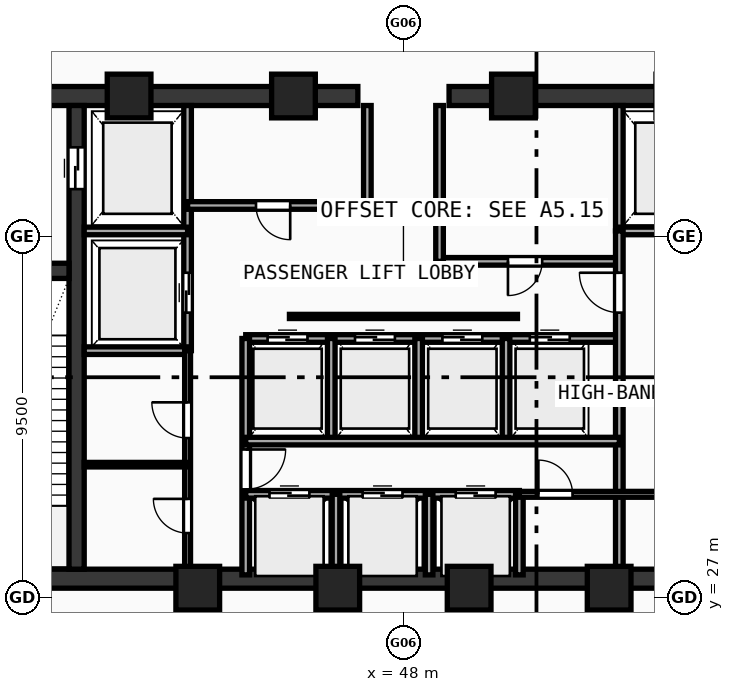
"""IFC4 building model, lengths in metres.
Left out: names, types, materials, properties, quantities, classifications, styles, units other than length and angle.
Written with IfcOpenShell. Run it as: python <this file> out.ifc"""

import sys

from ifc_helpers import new_model, si_unit, direction, frame, frame_2d, origin, origin_with_axes, origin_2d, place, context, subcontext, project, spatial, rectangle, hollow_rectangle, extrude, source, transform, mapped, element, fill, save


model = new_model("IFC4")
c1 = context("Model", 3, precision=1e-05, world=origin(), true_north=direction((0.0, 1.0)))
c2 = subcontext(c1, "Body", "Model", "MODEL_VIEW")
j1 = project(units=[si_unit("LENGTHUNIT", "METRE"), si_unit("PLANEANGLEUNIT", "RADIAN")], contexts=[c1])
p1 = place(None, origin())
s1 = spatial("IfcSite", under=j1, at=p1, CompositionType="ELEMENT")
p2 = place(p1, origin())
s2 = spatial("IfcBuilding", under=s1, at=p2, CompositionType="ELEMENT")
p3 = place(p2, frame((0.0, 0.0, 218.96)))
s3 = spatial("IfcBuildingStorey", under=s2, at=p3, CompositionType="ELEMENT", Elevation=218.96)
p4 = place(p3, frame((35.55, 27.5, 0.0), z_axis=(0.0, 0.0, 1.0), x_axis=(1.0, 0.0, 0.0)))
e1 = element("IfcWall", 1, at=p4, inside=s3, PredefinedType="SHEAR", context=c2, shape_type="SweptSolid", body=[
    extrude(rectangle(XDim=24.9, YDim=0.5, at=frame_2d((12.45, 0.0))), origin(), (0.0, 0.0, 1.0), 5.57),
])
p5 = place(p3, frame((35.55, 40.2, 0.0), z_axis=(0.0, 0.0, 1.0), x_axis=(1.0, 0.0, 0.0)))
e2 = element("IfcWall", 2, at=p5, inside=s3, PredefinedType="SHEAR", context=c2, shape_type="SweptSolid", body=[
    extrude(rectangle(XDim=11.25, YDim=0.5, at=frame_2d((5.625, 0.0))), origin(), (0.0, 0.0, 1.0), 5.57),
])
p6 = place(p5, frame((1.6, 0.0, 0.0)))
e3 = element("IfcOpeningElement", 3, at=p6, cuts=e2, PredefinedType="OPENING", context=c2, shape_type="SweptSolid", body=[
    extrude(rectangle(XDim=1.05, YDim=2.1, at=frame_2d((0.525, 1.05))), frame((0.0, 0.26, 0.0), z_axis=(0.0, -1.0, 0.0), x_axis=(1.0, 0.0, 0.0)), (0.0, 0.0, 1.0), 0.52),
])
p7 = place(p3, frame((49.2, 40.2, 0.0), z_axis=(0.0, 0.0, 1.0), x_axis=(1.0, 0.0, 0.0)))
e4 = element("IfcWall", 4, at=p7, inside=s3, PredefinedType="SHEAR", context=c2, shape_type="SweptSolid", body=[
    extrude(rectangle(XDim=11.25, YDim=0.5, at=frame_2d((5.625, 0.0))), origin(), (0.0, 0.0, 1.0), 5.57),
])
p8 = place(p7, frame((8.6, 0.0, 0.0)))
e5 = element("IfcOpeningElement", 5, at=p8, cuts=e4, PredefinedType="OPENING", context=c2, shape_type="SweptSolid", body=[
    extrude(rectangle(XDim=1.05, YDim=2.1, at=frame_2d((0.525, 1.05))), frame((0.0, 0.26, 0.0), z_axis=(0.0, -1.0, 0.0), x_axis=(1.0, 0.0, 0.0)), (0.0, 0.0, 1.0), 0.52),
])
p9 = place(p3, frame((39.4, 27.75, 0.0), z_axis=(0.0, 0.0, 1.0), x_axis=(0.0, 1.0, 0.0)))
e6 = element("IfcWall", 6, at=p9, inside=s3, PredefinedType="SHEAR", context=c2, shape_type="SweptSolid", body=[
    extrude(rectangle(XDim=12.2, YDim=0.4, at=frame_2d((6.1, 0.0))), origin(), (0.0, 0.0, 1.0), 5.57),
])
p10 = place(p9, frame((10.0, 0.0, 0.0)))
e7 = element("IfcOpeningElement", 7, at=p10, cuts=e6, PredefinedType="OPENING", context=c2, shape_type="SweptSolid", body=[
    extrude(rectangle(XDim=1.1, YDim=2.1, at=frame_2d((0.55, 1.05))), frame((0.0, 0.21, 0.0), z_axis=(0.0, -1.0, 0.0), x_axis=(1.0, 0.0, 0.0)), (0.0, 0.0, 1.0), 0.42),
])
p11 = place(p3, frame((36.05, 35.6, 0.0), z_axis=(0.0, 0.0, 1.0), x_axis=(1.0, 0.0, 0.0)))
e8 = element("IfcWall", 8, at=p11, inside=s3, PredefinedType="SHEAR", context=c2, shape_type="SweptSolid", body=[
    extrude(rectangle(XDim=3.15, YDim=0.4, at=frame_2d((1.575, 0.0))), origin(), (0.0, 0.0, 1.0), 5.57),
])
p12 = place(p11, frame((1.07, 0.0, 0.0)))
e9 = element("IfcOpeningElement", 9, at=p12, cuts=e8, PredefinedType="OPENING", context=c2, shape_type="SweptSolid", body=[
    extrude(rectangle(XDim=1.05, YDim=2.1, at=frame_2d((0.525, 1.05))), frame((0.0, 0.21, 0.0), z_axis=(0.0, -1.0, 0.0), x_axis=(1.0, 0.0, 0.0)), (0.0, 0.0, 1.0), 0.42),
])
m1 = source(origin(), c2, "Body", "SweptSolid", [
    extrude(hollow_rectangle(XDim=1.15, YDim=1.15, WallThickness=0.048, at=origin_2d()), origin(), (0.0, 0.0, 1.0), 5.85),
])
for number, where, z_axis, x_axis in (
    (10, (42.588, 27.25, -0.28), (0.0, 0.0, 1.0), (1.0, 0.0, 0.0)),
    (11, (46.272, 27.25, -0.28), (0.0, 0.0, 1.0), (1.0, 0.0, 0.0)),
    (12, (49.729, 27.25, -0.28), (0.0, 0.0, 1.0), (1.0, 0.0, 0.0)),
    (13, (53.412, 27.25, -0.28), (0.0, 0.0, 1.0), (1.0, 0.0, 0.0)),
    (14, (50.894, 40.2, -0.28), (0.0, 0.0, 1.0), (1.0, 0.0, 0.0)),
    (15, (45.106, 40.2, -0.28), (0.0, 0.0, 1.0), (1.0, 0.0, 0.0)),
    (16, (40.781, 40.2, -0.28), (0.0, 0.0, 1.0), (1.0, 0.0, 0.0)),
):
    element("IfcColumn", number, at=place(p3, frame(where, z_axis=z_axis, x_axis=x_axis)), inside=s3, PredefinedType="COLUMN", context=c2, shape_type="MappedRepresentation", body=[
        mapped(m1, transform((0.0, 0.0, 0.0), scale=1.0)),
    ])
p13 = place(p3, frame((42.32, 33.5, 0.0), z_axis=(0.0, 0.0, 1.0), x_axis=(0.0, 1.0, 0.0)))
e17 = element("IfcWall", 17, at=p13, inside=s3, PredefinedType="SOLIDWALL", context=c2, shape_type="SweptSolid", body=[
    extrude(rectangle(XDim=6.45, YDim=0.2, at=frame_2d((3.225, 0.0))), origin(), (0.0, 0.0, 1.0), 5.57),
])
p14 = place(p13, frame((1.0, 0.0, 0.0)))
e18 = element("IfcOpeningElement", 18, at=p14, cuts=e17, PredefinedType="OPENING", context=c2, shape_type="SweptSolid", body=[
    extrude(rectangle(XDim=1.05, YDim=2.1, at=frame_2d((0.525, 1.05))), frame((0.0, 0.11, 0.0), z_axis=(0.0, -1.0, 0.0), x_axis=(1.0, 0.0, 0.0)), (0.0, 0.0, 1.0), 0.22),
])
for number, where, z_axis, x_axis in (
    (19, (39.6, 36.65, 0.0), (0.0, 0.0, 1.0), (1.0, 0.0, 0.0)),
    (20, (39.6, 33.5, 0.0), (0.0, 0.0, 1.0), (1.0, 0.0, 0.0)),
):
    element("IfcWall", number, at=place(p3, frame(where, z_axis=z_axis, x_axis=x_axis)), inside=s3, PredefinedType="SOLIDWALL", context=c2, shape_type="SweptSolid", body=[
        extrude(rectangle(XDim=2.72, YDim=0.2, at=frame_2d((1.36, 0.0))), origin(), (0.0, 0.0, 1.0), 5.57),
    ])
p15 = place(p3, frame((53.68, 36.65, 0.0), z_axis=(0.0, 0.0, 1.0), x_axis=(0.0, 1.0, 0.0)))
e21 = element("IfcWall", 21, at=p15, inside=s3, PredefinedType="SOLIDWALL", context=c2, shape_type="SweptSolid", body=[
    extrude(rectangle(XDim=3.3, YDim=0.2, at=frame_2d((1.65, 0.0))), origin(), (0.0, 0.0, 1.0), 5.57),
])
p16 = place(p3, frame((53.68, 36.65, 0.0), z_axis=(0.0, 0.0, 1.0), x_axis=(1.0, 0.0, 0.0)))
e22 = element("IfcWall", 22, at=p16, inside=s3, PredefinedType="SOLIDWALL", context=c2, shape_type="SweptSolid", body=[
    extrude(rectangle(XDim=2.72, YDim=0.2, at=frame_2d((1.36, 0.0))), origin(), (0.0, 0.0, 1.0), 5.57),
])
p17 = place(p3, frame((42.32, 37.32, 0.0), z_axis=(0.0, 0.0, 1.0), x_axis=(1.0, 0.0, 0.0)))
e23 = element("IfcWall", 23, at=p17, inside=s3, PredefinedType="SOLIDWALL", context=c2, shape_type="SweptSolid", body=[
    extrude(rectangle(XDim=4.73, YDim=0.2, at=frame_2d((2.365, 0.0))), origin(), (0.0, 0.0, 1.0), 5.57),
])
p18 = place(p17, frame((1.8, 0.0, 0.0)))
e24 = element("IfcOpeningElement", 24, at=p18, cuts=e23, PredefinedType="OPENING", context=c2, shape_type="SweptSolid", body=[
    extrude(rectangle(XDim=0.9, YDim=2.1, at=frame_2d((0.45, 1.05))), frame((0.0, 0.11, 0.0), z_axis=(0.0, -1.0, 0.0), x_axis=(1.0, 0.0, 0.0)), (0.0, 0.0, 1.0), 0.22),
])
p19 = place(p3, frame((48.95, 35.85, 0.0), z_axis=(0.0, 0.0, 1.0), x_axis=(1.0, 0.0, 0.0)))
e25 = element("IfcWall", 25, at=p19, inside=s3, PredefinedType="SOLIDWALL", context=c2, shape_type="SweptSolid", body=[
    extrude(rectangle(XDim=4.73, YDim=0.2, at=frame_2d((2.365, 0.0))), origin(), (0.0, 0.0, 1.0), 5.57),
])
p20 = place(p19, frame((1.8, 0.0, 0.0)))
e26 = element("IfcOpeningElement", 26, at=p20, cuts=e25, PredefinedType="OPENING", context=c2, shape_type="SweptSolid", body=[
    extrude(rectangle(XDim=0.9, YDim=2.1, at=frame_2d((0.45, 1.05))), frame((0.0, 0.11, 0.0), z_axis=(0.0, -1.0, 0.0), x_axis=(1.0, 0.0, 0.0)), (0.0, 0.0, 1.0), 0.22),
])
p21 = place(p3, frame((47.05, 37.32, 0.0), z_axis=(0.0, 0.0, 1.0), x_axis=(0.0, 1.0, 0.0)))
e27 = element("IfcWall", 27, at=p21, inside=s3, PredefinedType="SOLIDWALL", context=c2, shape_type="SweptSolid", body=[
    extrude(rectangle(XDim=2.63, YDim=0.2, at=frame_2d((1.315, 0.0))), origin(), (0.0, 0.0, 1.0), 5.57),
])
p22 = place(p3, frame((48.95, 35.85, 0.0), z_axis=(0.0, 0.0, 1.0), x_axis=(0.0, 1.0, 0.0)))
e28 = element("IfcWall", 28, at=p22, inside=s3, PredefinedType="SOLIDWALL", context=c2, shape_type="SweptSolid", body=[
    extrude(rectangle(XDim=4.1, YDim=0.2, at=frame_2d((2.05, 0.0))), origin(), (0.0, 0.0, 1.0), 5.57),
])
p23 = place(p3, frame((43.85, 33.82, 0.0), z_axis=(0.0, 0.0, 1.0), x_axis=(1.0, 0.0, 0.0)))
e29 = element("IfcWall", 29, at=p23, inside=s3, PredefinedType="SOLIDWALL", context=c2, shape_type="SweptSolid", body=[
    extrude(rectangle(XDim=9.83, YDim=0.2, at=frame_2d((4.915, 0.0))), origin(), (0.0, 0.0, 1.0), 5.57),
])
p24 = place(p23, frame((0.575, 0.0, 0.0)))
e30 = element("IfcOpeningElement", 30, at=p24, cuts=e29, PredefinedType="OPENING", context=c2, shape_type="SweptSolid", body=[
    extrude(rectangle(XDim=1.05, YDim=2.1, at=frame_2d((0.525, 1.05))), frame((0.0, 0.11, 0.0), z_axis=(0.0, -1.0, 0.0), x_axis=(1.0, 0.0, 0.0)), (0.0, 0.0, 1.0), 0.22),
])
p25 = place(p23, frame((2.875, 0.0, 0.0)))
e31 = element("IfcOpeningElement", 31, at=p25, cuts=e29, PredefinedType="OPENING", context=c2, shape_type="SweptSolid", body=[
    extrude(rectangle(XDim=1.05, YDim=2.1, at=frame_2d((0.525, 1.05))), frame((0.0, 0.11, 0.0), z_axis=(0.0, -1.0, 0.0), x_axis=(1.0, 0.0, 0.0)), (0.0, 0.0, 1.0), 0.22),
])
p26 = place(p23, frame((5.175, 0.0, 0.0)))
e32 = element("IfcOpeningElement", 32, at=p26, cuts=e29, PredefinedType="OPENING", context=c2, shape_type="SweptSolid", body=[
    extrude(rectangle(XDim=1.05, YDim=2.1, at=frame_2d((0.525, 1.05))), frame((0.0, 0.11, 0.0), z_axis=(0.0, -1.0, 0.0), x_axis=(1.0, 0.0, 0.0)), (0.0, 0.0, 1.0), 0.22),
])
p27 = place(p23, frame((7.475, 0.0, 0.0)))
e33 = element("IfcOpeningElement", 33, at=p27, cuts=e29, PredefinedType="OPENING", context=c2, shape_type="SweptSolid", body=[
    extrude(rectangle(XDim=1.05, YDim=2.1, at=frame_2d((0.525, 1.05))), frame((0.0, 0.11, 0.0), z_axis=(0.0, -1.0, 0.0), x_axis=(1.0, 0.0, 0.0)), (0.0, 0.0, 1.0), 0.22),
])
p28 = place(p3, frame((43.85, 27.6, 0.0), z_axis=(0.0, 0.0, 1.0), x_axis=(0.0, 1.0, 0.0)))
e34 = element("IfcWall", 34, at=p28, inside=s3, PredefinedType="SOLIDWALL", context=c2, shape_type="SweptSolid", body=[
    extrude(rectangle(XDim=6.22, YDim=0.2, at=frame_2d((3.11, 0.0))), origin(), (0.0, 0.0, 1.0), 5.57),
])
p29 = place(p28, frame((2.25, 0.0, 0.0)))
e35 = element("IfcOpeningElement", 35, at=p29, cuts=e34, PredefinedType="OPENING", context=c2, shape_type="SweptSolid", body=[
    extrude(rectangle(XDim=1.05, YDim=2.1, at=frame_2d((0.525, 1.05))), frame((0.0, 0.11, 0.0), z_axis=(0.0, -1.0, 0.0), x_axis=(1.0, 0.0, 0.0)), (0.0, 0.0, 1.0), 0.22),
])
p30 = place(p3, frame((53.68, 27.6, 0.0), z_axis=(0.0, 0.0, 1.0), x_axis=(0.0, 1.0, 0.0)))
e36 = element("IfcWall", 36, at=p30, inside=s3, PredefinedType="SOLIDWALL", context=c2, shape_type="SweptSolid", body=[
    extrude(rectangle(XDim=9.05, YDim=0.2, at=frame_2d((4.525, 0.0))), origin(), (0.0, 0.0, 1.0), 2.22),
])
p31 = place(p30, frame((6.9, 0.0, 0.0)))
e37 = element("IfcOpeningElement", 37, at=p31, cuts=e36, PredefinedType="OPENING", context=c2, shape_type="SweptSolid", body=[
    extrude(rectangle(XDim=1.05, YDim=2.1, at=frame_2d((0.525, 1.05))), frame((0.0, 0.11, 0.0), z_axis=(0.0, -1.0, 0.0), x_axis=(1.0, 0.0, 0.0)), (0.0, 0.0, 1.0), 0.22),
])
for number, where, z_axis, x_axis in (
    (38, (46.1, 31.12, 0.0), (0.0, 0.0, 1.0), (0.0, 1.0, 0.0)),
    (39, (48.4, 31.12, 0.0), (0.0, 0.0, 1.0), (0.0, 1.0, 0.0)),
    (40, (50.7, 31.12, 0.0), (0.0, 0.0, 1.0), (0.0, 1.0, 0.0)),
):
    element("IfcWall", number, at=place(p3, frame(where, z_axis=z_axis, x_axis=x_axis)), inside=s3, PredefinedType="SOLIDWALL", context=c2, shape_type="SweptSolid", body=[
        extrude(rectangle(XDim=2.7, YDim=0.2, at=frame_2d((1.35, 0.0))), origin(), (0.0, 0.0, 1.0), 5.57),
    ])
p32 = place(p3, frame((43.85, 29.72, 0.0), z_axis=(0.0, 0.0, 1.0), x_axis=(1.0, 0.0, 0.0)))
e41 = element("IfcWall", 41, at=p32, inside=s3, PredefinedType="SOLIDWALL", context=c2, shape_type="SweptSolid", body=[
    extrude(rectangle(XDim=7.2, YDim=0.2, at=frame_2d((3.6, 0.0))), origin(), (0.0, 0.0, 1.0), 5.57),
])
p33 = place(p32, frame((0.625, 0.0, 0.0)))
e42 = element("IfcOpeningElement", 42, at=p33, cuts=e41, PredefinedType="OPENING", context=c2, shape_type="SweptSolid", body=[
    extrude(rectangle(XDim=1.05, YDim=2.1, at=frame_2d((0.525, 1.05))), frame((0.0, 0.11, 0.0), z_axis=(0.0, -1.0, 0.0), x_axis=(1.0, 0.0, 0.0)), (0.0, 0.0, 1.0), 0.22),
])
p34 = place(p32, frame((3.075, 0.0, 0.0)))
e43 = element("IfcOpeningElement", 43, at=p34, cuts=e41, PredefinedType="OPENING", context=c2, shape_type="SweptSolid", body=[
    extrude(rectangle(XDim=1.05, YDim=2.1, at=frame_2d((0.525, 1.05))), frame((0.0, 0.11, 0.0), z_axis=(0.0, -1.0, 0.0), x_axis=(1.0, 0.0, 0.0)), (0.0, 0.0, 1.0), 0.22),
])
p35 = place(p32, frame((5.525, 0.0, 0.0)))
e44 = element("IfcOpeningElement", 44, at=p35, cuts=e41, PredefinedType="OPENING", context=c2, shape_type="SweptSolid", body=[
    extrude(rectangle(XDim=1.05, YDim=2.1, at=frame_2d((0.525, 1.05))), frame((0.0, 0.11, 0.0), z_axis=(0.0, -1.0, 0.0), x_axis=(1.0, 0.0, 0.0)), (0.0, 0.0, 1.0), 0.22),
])
p36 = place(p3, frame((51.05, 27.6, 0.0), z_axis=(0.0, 0.0, 1.0), x_axis=(0.0, 1.0, 0.0)))
e45 = element("IfcWall", 45, at=p36, inside=s3, PredefinedType="SOLIDWALL", context=c2, shape_type="SweptSolid", body=[
    extrude(rectangle(XDim=2.12, YDim=0.2, at=frame_2d((1.06, 0.0))), origin(), (0.0, 0.0, 1.0), 5.57),
])
p37 = place(p3, frame((43.85, 31.12, 0.0), z_axis=(0.0, 0.0, 1.0), x_axis=(1.0, 0.0, 0.0)))
e46 = element("IfcWall", 46, at=p37, inside=s3, PredefinedType="SOLIDWALL", context=c2, shape_type="SweptSolid", body=[
    extrude(rectangle(XDim=9.83, YDim=0.2, at=frame_2d((4.915, 0.0))), origin(), (0.0, 0.0, 1.0), 5.57),
])
p38 = place(p3, frame((46.225, 27.6, 0.0), z_axis=(0.0, 0.0, 1.0), x_axis=(0.0, 1.0, 0.0)))
e47 = element("IfcWall", 47, at=p38, inside=s3, PredefinedType="SOLIDWALL", context=c2, shape_type="SweptSolid", body=[
    extrude(rectangle(XDim=2.12, YDim=0.2, at=frame_2d((1.06, 0.0))), origin(), (0.0, 0.0, 1.0), 2.22),
])
p39 = place(p3, frame((48.675, 27.6, 0.0), z_axis=(0.0, 0.0, 1.0), x_axis=(0.0, 1.0, 0.0)))
e48 = element("IfcWall", 48, at=p39, inside=s3, PredefinedType="SOLIDWALL", context=c2, shape_type="SweptSolid", body=[
    extrude(rectangle(XDim=2.12, YDim=0.2, at=frame_2d((1.06, 0.0))), origin(), (0.0, 0.0, 1.0), 5.57),
])
p40 = place(p3, frame((42.32, 27.6, 0.0), z_axis=(0.0, 0.0, 1.0), x_axis=(0.0, 1.0, 0.0)))
e49 = element("IfcWall", 49, at=p40, inside=s3, PredefinedType="PARTITIONING", context=c2, shape_type="SweptSolid", body=[
    extrude(rectangle(XDim=5.9, YDim=0.155, at=frame_2d((2.95, 0.0))), origin(), (0.0, 0.0, 1.0), 2.22),
])
p41 = place(p40, frame((1.1, 0.0, 0.0)))
e50 = element("IfcOpeningElement", 50, at=p41, cuts=e49, PredefinedType="OPENING", context=c2, shape_type="SweptSolid", body=[
    extrude(rectangle(XDim=0.9, YDim=2.1, at=frame_2d((0.45, 1.05))), frame((0.0, 0.087, 0.0), z_axis=(0.0, -1.0, 0.0), x_axis=(1.0, 0.0, 0.0)), (0.0, 0.0, 1.0), 0.175),
])
p42 = place(p40, frame((3.6, 0.0, 0.0)))
e51 = element("IfcOpeningElement", 51, at=p42, cuts=e49, PredefinedType="OPENING", context=c2, shape_type="SweptSolid", body=[
    extrude(rectangle(XDim=0.94, YDim=2.1, at=frame_2d((0.47, 1.05))), frame((0.0, 0.087, 0.0), z_axis=(0.0, -1.0, 0.0), x_axis=(1.0, 0.0, 0.0)), (0.0, 0.0, 1.0), 0.175),
])
p43 = place(p3, frame((51.05, 29.72, 0.0), z_axis=(0.0, 0.0, 1.0), x_axis=(1.0, 0.0, 0.0)))
e52 = element("IfcWall", 52, at=p43, inside=s3, PredefinedType="PARTITIONING", context=c2, shape_type="SweptSolid", body=[
    extrude(rectangle(XDim=4.07, YDim=0.155, at=frame_2d((2.035, 0.0))), origin(), (0.0, 0.0, 1.0), 5.57),
])
p44 = place(p43, frame((0.5, 0.0, 0.0)))
e53 = element("IfcOpeningElement", 53, at=p44, cuts=e52, PredefinedType="OPENING", context=c2, shape_type="SweptSolid", body=[
    extrude(rectangle(XDim=0.9, YDim=2.1, at=frame_2d((0.45, 1.05))), frame((0.0, 0.087, 0.0), z_axis=(0.0, -1.0, 0.0), x_axis=(1.0, 0.0, 0.0)), (0.0, 0.0, 1.0), 0.175),
])
p45 = place(p3, frame((39.6, 30.5, 0.0), z_axis=(0.0, 0.0, 1.0), x_axis=(1.0, 0.0, 0.0)))
e54 = element("IfcWall", 54, at=p45, inside=s3, PredefinedType="PARTITIONING", context=c2, shape_type="SweptSolid", body=[
    extrude(rectangle(XDim=2.72, YDim=0.12, at=frame_2d((1.36, 0.0))), origin(), (0.0, 0.0, 1.0), 5.57),
])
p46 = place(p3, frame((45.0, 34.4, 0.0), z_axis=(0.0, 0.0, 1.0), x_axis=(1.0, 0.0, 0.0)))
e55 = element("IfcWall", 55, at=p46, inside=s3, PredefinedType="MOVABLE", context=c2, shape_type="SweptSolid", body=[
    extrude(rectangle(XDim=6.0, YDim=0.11, at=frame_2d((3.0, 0.0))), origin(), (0.0, 0.0, 1.0), 2.5),
])
m2 = source(origin(), c2, "Body", "SweptSolid", [
    extrude(rectangle(XDim=1.1, YDim=2.1, at=frame_2d((0.55, 1.05))), frame((0.0, 0.025, 0.0), z_axis=(0.0, -1.0, 0.0), x_axis=(1.0, 0.0, 0.0)), (0.0, 0.0, 1.0), 0.05),
])
p47 = place(p10, frame((1.1, 0.0, 0.0), z_axis=(0.0, 0.0, 1.0), x_axis=(-1.0, 0.0, 0.0)))
e56 = element("IfcDoor", 56, at=p47, inside=s3, OperationType="DOUBLE_DOOR_SLIDING", PredefinedType="DOOR", context=c2, shape_type="MappedRepresentation", body=[
    mapped(m2, transform((0.0, 0.0, 0.0), scale=1.0)),
])
fill(e7, e56)
m3 = source(origin(), c2, "Body", "SweptSolid", [
    extrude(rectangle(XDim=1.05, YDim=2.1, at=frame_2d((0.525, 1.05))), frame((0.0, 0.025, 0.0), z_axis=(0.0, -1.0, 0.0), x_axis=(1.0, 0.0, 0.0)), (0.0, 0.0, 1.0), 0.05),
])
p48 = place(p14, origin_with_axes())
e57 = element("IfcDoor", 57, at=p48, inside=s3, OperationType="DOUBLE_DOOR_SLIDING", PredefinedType="DOOR", context=c2, shape_type="MappedRepresentation", body=[
    mapped(m3, transform((0.0, 0.0, 0.0), scale=1.0)),
])
fill(e18, e57)
m4 = source(origin(), c2, "Body", "SweptSolid", [
    extrude(rectangle(XDim=0.9, YDim=2.1, at=frame_2d((0.45, 1.05))), frame((0.0, 0.025, 0.0), z_axis=(0.0, -1.0, 0.0), x_axis=(1.0, 0.0, 0.0)), (0.0, 0.0, 1.0), 0.05),
])
p49 = place(p18, frame((0.9, 0.0, 0.0), z_axis=(0.0, 0.0, 1.0), x_axis=(-1.0, 0.0, 0.0)))
e58 = element("IfcDoor", 58, at=p49, inside=s3, OperationType="SINGLE_SWING_LEFT", PredefinedType="DOOR", context=c2, shape_type="MappedRepresentation", body=[
    mapped(m4, transform((0.0, 0.0, 0.0), scale=1.0)),
])
fill(e24, e58)
p50 = place(p20, frame((0.9, 0.0, 0.0), z_axis=(0.0, 0.0, 1.0), x_axis=(-1.0, 0.0, 0.0)))
e59 = element("IfcDoor", 59, at=p50, inside=s3, OperationType="SINGLE_SWING_RIGHT", PredefinedType="DOOR", context=c2, shape_type="MappedRepresentation", body=[
    mapped(m4, transform((0.0, 0.0, 0.0), scale=1.0)),
])
fill(e26, e59)
p51 = place(p24, origin_with_axes())
e60 = element("IfcDoor", 60, at=p51, inside=s3, OperationType="DOUBLE_DOOR_SLIDING", PredefinedType="DOOR", context=c2, shape_type="MappedRepresentation", body=[
    mapped(m3, transform((0.0, 0.0, 0.0), scale=1.0)),
])
fill(e30, e60)
p52 = place(p25, origin_with_axes())
e61 = element("IfcDoor", 61, at=p52, inside=s3, OperationType="DOUBLE_DOOR_SLIDING", PredefinedType="DOOR", context=c2, shape_type="MappedRepresentation", body=[
    mapped(m3, transform((0.0, 0.0, 0.0), scale=1.0)),
])
fill(e31, e61)
p53 = place(p26, origin_with_axes())
e62 = element("IfcDoor", 62, at=p53, inside=s3, OperationType="DOUBLE_DOOR_SLIDING", PredefinedType="DOOR", context=c2, shape_type="MappedRepresentation", body=[
    mapped(m3, transform((0.0, 0.0, 0.0), scale=1.0)),
])
fill(e32, e62)
p54 = place(p27, origin_with_axes())
e63 = element("IfcDoor", 63, at=p54, inside=s3, OperationType="DOUBLE_DOOR_SLIDING", PredefinedType="DOOR", context=c2, shape_type="MappedRepresentation", body=[
    mapped(m3, transform((0.0, 0.0, 0.0), scale=1.0)),
])
fill(e33, e63)
p55 = place(p29, frame((1.05, 0.0, 0.0), z_axis=(0.0, 0.0, 1.0), x_axis=(-1.0, 0.0, 0.0)))
e64 = element("IfcDoor", 64, at=p55, inside=s3, OperationType="SINGLE_SWING_LEFT", PredefinedType="DOOR", context=c2, shape_type="MappedRepresentation", body=[
    mapped(m3, transform((0.0, 0.0, 0.0), scale=1.0)),
])
fill(e35, e64)
p56 = place(p31, origin_with_axes())
e65 = element("IfcDoor", 65, at=p56, inside=s3, OperationType="SINGLE_SWING_RIGHT", PredefinedType="DOOR", context=c2, shape_type="MappedRepresentation", body=[
    mapped(m3, transform((0.0, 0.0, 0.0), scale=1.0)),
])
fill(e37, e65)
p57 = place(p33, origin_with_axes())
e66 = element("IfcDoor", 66, at=p57, inside=s3, OperationType="DOUBLE_DOOR_SLIDING", PredefinedType="DOOR", context=c2, shape_type="MappedRepresentation", body=[
    mapped(m3, transform((0.0, 0.0, 0.0), scale=1.0)),
])
fill(e42, e66)
p58 = place(p34, origin_with_axes())
e67 = element("IfcDoor", 67, at=p58, inside=s3, OperationType="DOUBLE_DOOR_SLIDING", PredefinedType="DOOR", context=c2, shape_type="MappedRepresentation", body=[
    mapped(m3, transform((0.0, 0.0, 0.0), scale=1.0)),
])
fill(e43, e67)
p59 = place(p35, origin_with_axes())
e68 = element("IfcDoor", 68, at=p59, inside=s3, OperationType="DOUBLE_DOOR_SLIDING", PredefinedType="DOOR", context=c2, shape_type="MappedRepresentation", body=[
    mapped(m3, transform((0.0, 0.0, 0.0), scale=1.0)),
])
fill(e44, e68)
p60 = place(p41, origin_with_axes())
e69 = element("IfcDoor", 69, at=p60, inside=s3, OperationType="SINGLE_SWING_RIGHT", PredefinedType="DOOR", context=c2, shape_type="MappedRepresentation", body=[
    mapped(m4, transform((0.0, 0.0, 0.0), scale=1.0)),
])
fill(e50, e69)
m5 = source(origin(), c2, "Body", "SweptSolid", [
    extrude(rectangle(XDim=0.94, YDim=2.1, at=frame_2d((0.47, 1.05))), frame((0.0, 0.025, 0.0), z_axis=(0.0, -1.0, 0.0), x_axis=(1.0, 0.0, 0.0)), (0.0, 0.0, 1.0), 0.05),
])
p61 = place(p42, origin_with_axes())
e70 = element("IfcDoor", 70, at=p61, inside=s3, OperationType="SINGLE_SWING_RIGHT", PredefinedType="DOOR", context=c2, shape_type="MappedRepresentation", body=[
    mapped(m5, transform((0.0, 0.0, 0.0), scale=1.0)),
])
fill(e51, e70)
p62 = place(p44, origin_with_axes())
e71 = element("IfcDoor", 71, at=p62, inside=s3, OperationType="SINGLE_SWING_LEFT", PredefinedType="DOOR", context=c2, shape_type="MappedRepresentation", body=[
    mapped(m4, transform((0.0, 0.0, 0.0), scale=1.0)),
])
fill(e53, e71)
save(model, sys.argv[1])
